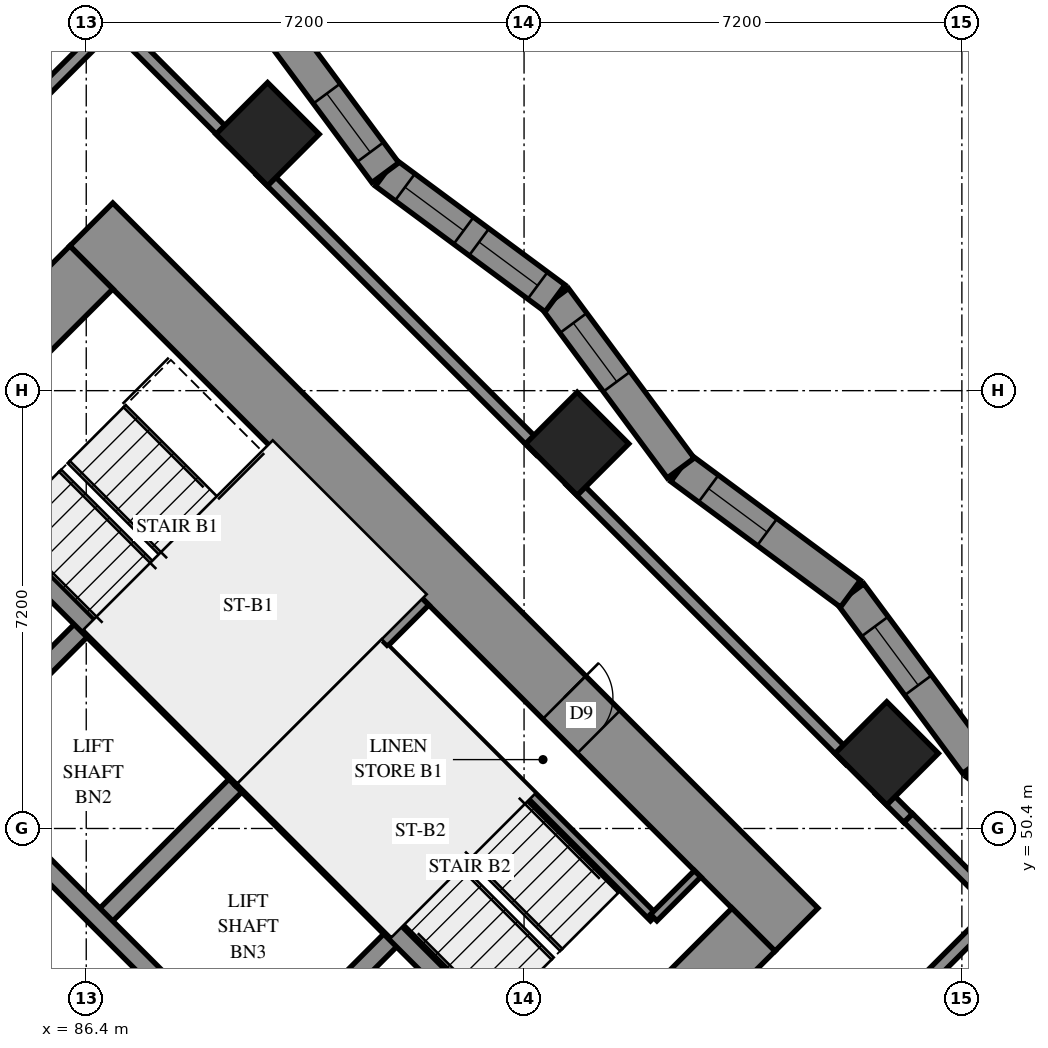
"""IFC4 building model, lengths in metres.
Left out: names, types, materials, properties, quantities, classifications, styles, units other than length and angle.
Written with IfcOpenShell. Run it as: python <this file> out.ifc"""

import sys

from ifc_helpers import new_model, si_unit, direction, frame, frame_2d, origin, origin_2d, place, context, subcontext, project, spatial, polyline, rectangle, outline, extrude, element, fill, save


model = new_model("IFC4")
c1 = context("Model", 3, precision=1e-05, world=origin(), true_north=direction((0.0, 1.0)))
c2 = subcontext(c1, "Body", "Model", "MODEL_VIEW")
j1 = project(units=[si_unit("LENGTHUNIT", "METRE"), si_unit("PLANEANGLEUNIT", "RADIAN")], contexts=[c1])
p1 = place(None, origin())
s1 = spatial("IfcSite", under=j1, at=p1, CompositionType="ELEMENT")
p2 = place(p1, origin())
s2 = spatial("IfcBuilding", under=s1, at=p2, CompositionType="ELEMENT")
p3 = place(p2, frame((0.0, 0.0, 50.8)))
s3 = spatial("IfcBuildingStorey", under=s2, at=p3, CompositionType="ELEMENT", Elevation=50.8)
for number, where, z_axis, x_axis in (
    (1, (89.382, 61.818, 0.0), (0.0, 0.0, 1.0), (0.707, -0.707, 0.0)),
    (2, (94.474, 56.727, 0.0), (0.0, 0.0, 1.0), (0.707, -0.707, 0.0)),
    (3, (99.565, 51.635, 0.0), (0.0, 0.0, 1.0), (0.707, -0.707, 0.0)),
):
    element("IfcColumn", number, at=place(p3, frame(where, z_axis=z_axis, x_axis=x_axis)), inside=s3, PredefinedType="COLUMN", context=c2, shape_type="SweptSolid", body=[
        extrude(rectangle(XDim=1.2, YDim=1.2, at=origin_2d()), origin(), (0.0, 0.0, 1.0), 3.1),
    ])
p4 = place(p3, frame((75.594, 49.443, -0.3), z_axis=(0.0, 0.0, 1.0), x_axis=(0.7071037324, -0.70710983, 0.0)))
e4 = element("IfcWall", 4, at=p4, inside=s3, PredefinedType="SHEAR", context=c2, shape_type="SweptSolid", body=[
    extrude(rectangle(XDim=16.4, YDim=1.0, at=frame_2d((8.2, 0.0))), origin(), (0.0, 0.0, 1.0), 2.7),
])
p5 = place(p3, frame((86.483, 60.333, -0.3), z_axis=(0.0, 0.0, 1.0), x_axis=(0.70710983, -0.7071037324, 0.0)))
e5 = element("IfcWall", 5, at=p5, inside=s3, PredefinedType="SHEAR", context=c2, shape_type="SweptSolid", body=[
    extrude(rectangle(XDim=16.4, YDim=1.0, at=frame_2d((8.2, 0.0))), origin(), (0.0, 0.0, 1.0), 2.7),
])
p6 = place(p5, frame((11.0, 0.0, 0.3)))
e6 = element("IfcOpeningElement", 6, at=p6, cuts=e5, PredefinedType="OPENING", context=c2, shape_type="SweptSolid", body=[
    extrude(rectangle(XDim=0.8, YDim=2.1, at=frame_2d((0.4, 1.05))), frame((0.0, 0.51, 0.0), z_axis=(0.0, -1.0, 0.0), x_axis=(1.0, 0.0, 0.0)), (0.0, 0.0, 1.0), 1.02),
])
p7 = place(p3, frame((76.301, 49.443, -0.3), z_axis=(0.0, 0.0, 1.0), x_axis=(0.7071067812, 0.7071067812, 0.0)))
e7 = element("IfcWall", 7, at=p7, inside=s3, PredefinedType="SHEAR", context=c2, shape_type="SweptSolid", body=[
    extrude(rectangle(XDim=14.4, YDim=1.0, at=frame_2d((7.2, 0.0))), origin(), (0.0, 0.0, 1.0), 2.7),
])
p8 = place(p7, frame((4.55, 0.0, 0.3)))
e8 = element("IfcOpeningElement", 8, at=p8, cuts=e7, PredefinedType="OPENING", context=c2, shape_type="SweptSolid", body=[
    extrude(rectangle(XDim=1.1, YDim=2.1, at=frame_2d((0.55, 1.05))), frame((0.0, 0.51, 0.0), z_axis=(0.0, -1.0, 0.0), x_axis=(1.0, 0.0, 0.0)), (0.0, 0.0, 1.0), 1.02),
])
p9 = place(p7, frame((11.35, 0.0, 0.3)))
e9 = element("IfcOpeningElement", 9, at=p9, cuts=e7, PredefinedType="OPENING", context=c2, shape_type="SweptSolid", body=[
    extrude(rectangle(XDim=1.1, YDim=2.1, at=frame_2d((0.55, 1.05))), frame((0.0, 0.51, 0.0), z_axis=(0.0, -1.0, 0.0), x_axis=(1.0, 0.0, 0.0)), (0.0, 0.0, 1.0), 1.02),
])
p10 = place(p3, frame((87.19, 38.554, -0.3), z_axis=(0.0, 0.0, 1.0), x_axis=(0.707103309, 0.7071102534, 0.0)))
e10 = element("IfcWall", 10, at=p10, inside=s3, PredefinedType="SHEAR", context=c2, shape_type="SweptSolid", body=[
    extrude(rectangle(XDim=14.4, YDim=1.0, at=frame_2d((7.2, 0.0))), origin(), (0.0, 0.0, 1.0), 2.7),
])
p11 = place(p10, frame((4.55, 0.0, 0.3)))
e11 = element("IfcOpeningElement", 11, at=p11, cuts=e10, PredefinedType="OPENING", context=c2, shape_type="SweptSolid", body=[
    extrude(rectangle(XDim=1.1, YDim=2.1, at=frame_2d((0.55, 1.05))), frame((0.0, 0.51, 0.0), z_axis=(0.0, -1.0, 0.0), x_axis=(1.0, 0.0, 0.0)), (0.0, 0.0, 1.0), 1.02),
])
p12 = place(p10, frame((11.35, 0.0, 0.3)))
e12 = element("IfcOpeningElement", 12, at=p12, cuts=e10, PredefinedType="OPENING", context=c2, shape_type="SweptSolid", body=[
    extrude(rectangle(XDim=1.1, YDim=2.1, at=frame_2d((0.55, 1.05))), frame((0.0, 0.51, 0.0), z_axis=(0.0, -1.0, 0.0), x_axis=(1.0, 0.0, 0.0)), (0.0, 0.0, 1.0), 1.02),
])
p13 = place(p3, frame((84.079, 51.423, 0.0), z_axis=(0.0, 0.0, 1.0), x_axis=(0.7071219326, 0.7070916295, 0.0)))
e13 = element("IfcWall", 13, at=p13, inside=s3, PredefinedType="SOLIDWALL", context=c2, shape_type="SweptSolid", body=[
    extrude(rectangle(XDim=3.3, YDim=0.3, at=frame_2d((1.65, 0.0))), origin(), (0.0, 0.0, 1.0), 3.1),
])
for number, where, z_axis, x_axis in (
    (14, (86.625, 48.878, 0.0), (0.0, 0.0, 1.0), (0.707, 0.707, 0.0)),
    (15, (89.17, 46.332, 0.0), (0.0, 0.0, 1.0), (0.707, 0.707, 0.0)),
):
    element("IfcWall", number, at=place(p3, frame(where, z_axis=z_axis, x_axis=x_axis)), inside=s3, PredefinedType="SOLIDWALL", context=c2, shape_type="SweptSolid", body=[
        extrude(rectangle(XDim=3.3, YDim=0.3, at=frame_2d((1.65, 0.0))), origin(), (0.0, 0.0, 1.0), 3.1),
    ])
p14 = place(p3, frame((78.988, 51.423, 0.0), z_axis=(0.0, 0.0, 1.0), x_axis=(0.7071067812, -0.7071067812, 0.0)))
e16 = element("IfcWall", 16, at=p14, inside=s3, PredefinedType="SOLIDWALL", context=c2, shape_type="SweptSolid", body=[
    extrude(rectangle(XDim=14.4, YDim=0.3, at=frame_2d((7.2, 0.0))), origin(), (0.0, 0.0, 1.0), 3.1),
])
p15 = place(p14, frame((1.25, 0.0, 0.0)))
e17 = element("IfcOpeningElement", 17, at=p15, cuts=e16, PredefinedType="OPENING", context=c2, shape_type="SweptSolid", body=[
    extrude(rectangle(XDim=1.1, YDim=2.1, at=frame_2d((0.55, 1.05))), frame((0.0, 0.16, 0.0), z_axis=(0.0, -1.0, 0.0), x_axis=(1.0, 0.0, 0.0)), (0.0, 0.0, 1.0), 0.32),
])
p16 = place(p14, frame((4.85, 0.0, 0.0)))
e18 = element("IfcOpeningElement", 18, at=p16, cuts=e16, PredefinedType="OPENING", context=c2, shape_type="SweptSolid", body=[
    extrude(rectangle(XDim=1.1, YDim=2.1, at=frame_2d((0.55, 1.05))), frame((0.0, 0.16, 0.0), z_axis=(0.0, -1.0, 0.0), x_axis=(1.0, 0.0, 0.0)), (0.0, 0.0, 1.0), 0.32),
])
p17 = place(p14, frame((8.45, 0.0, 0.0)))
e19 = element("IfcOpeningElement", 19, at=p17, cuts=e16, PredefinedType="OPENING", context=c2, shape_type="SweptSolid", body=[
    extrude(rectangle(XDim=1.1, YDim=2.1, at=frame_2d((0.55, 1.05))), frame((0.0, 0.16, 0.0), z_axis=(0.0, -1.0, 0.0), x_axis=(1.0, 0.0, 0.0)), (0.0, 0.0, 1.0), 0.32),
])
p18 = place(p14, frame((12.05, 0.0, 0.0)))
e20 = element("IfcOpeningElement", 20, at=p18, cuts=e16, PredefinedType="OPENING", context=c2, shape_type="SweptSolid", body=[
    extrude(rectangle(XDim=1.1, YDim=2.1, at=frame_2d((0.55, 1.05))), frame((0.0, 0.16, 0.0), z_axis=(0.0, -1.0, 0.0), x_axis=(1.0, 0.0, 0.0)), (0.0, 0.0, 1.0), 0.32),
])
p19 = place(p3, frame((81.534, 53.969, 0.0), z_axis=(0.0, 0.0, 1.0), x_axis=(0.707103309, -0.7071102534, 0.0)))
e21 = element("IfcWall", 21, at=p19, inside=s3, PredefinedType="SOLIDWALL", context=c2, shape_type="SweptSolid", body=[
    extrude(rectangle(XDim=14.4, YDim=0.3, at=frame_2d((7.2, 0.0))), origin(), (0.0, 0.0, 1.0), 3.1),
])
p20 = place(p19, frame((12.05, 0.0, 0.0)))
e22 = element("IfcOpeningElement", 22, at=p20, cuts=e21, PredefinedType="OPENING", context=c2, shape_type="SweptSolid", body=[
    extrude(rectangle(XDim=1.1, YDim=2.1, at=frame_2d((0.55, 1.05))), frame((0.0, 0.16, 0.0), z_axis=(0.0, -1.0, 0.0), x_axis=(1.0, 0.0, 0.0)), (0.0, 0.0, 1.0), 0.32),
])
for number, where, z_axis, x_axis in (
    (23, (83.867, 56.302, 0.0), (0.0, 0.0, 1.0), (0.707, -0.707, 0.0)),
    (24, (88.958, 51.211, 0.0), (0.0, 0.0, 1.0), (0.707, -0.707, 0.0)),
):
    element("IfcWall", number, at=place(p3, frame(where, z_axis=z_axis, x_axis=x_axis)), inside=s3, PredefinedType="SOLIDWALL", context=c2, shape_type="SweptSolid", body=[
        extrude(rectangle(XDim=7.2, YDim=0.3, at=frame_2d((3.6, 0.0))), origin(), (0.0, 0.0, 1.0), 3.1),
    ])
p21 = place(p3, frame((88.958, 51.211, 0.0), z_axis=(0.0, 0.0, 1.0), x_axis=(0.7071067812, 0.7071067812, 0.0)))
e25 = element("IfcWall", 25, at=p21, inside=s3, PredefinedType="SOLIDWALL", context=c2, shape_type="SweptSolid", body=[
    extrude(rectangle(XDim=4.2, YDim=0.3, at=frame_2d((2.1, 0.0))), origin(), (0.0, 0.0, 1.0), 3.1),
])
p22 = place(p3, frame((103.825, 49.403, 0.0), z_axis=(0.0, 0.0, 1.0), x_axis=(-0.8036444119, 0.5951097875, 0.0)))
e26 = element("IfcWall", 26, at=p22, inside=s3, PredefinedType="SOLIDWALL", context=c2, shape_type="SweptSolid", body=[
    extrude(outline(polyline([(-0.041, -0.275), (3.432, -0.275), (3.514, 0.275), (0.041, 0.275), (-0.041, -0.275)])), origin(), (0.0, 0.0, 1.0), 3.1),
])
p23 = place(p22, frame((1.537, 0.0, 0.5)))
e27 = element("IfcOpeningElement", 27, at=p23, cuts=e26, PredefinedType="OPENING", context=c2, shape_type="SweptSolid", body=[
    extrude(rectangle(XDim=1.2, YDim=2.45, at=frame_2d((0.6, 1.225))), frame((0.0, 0.285, 0.0), z_axis=(0.0, -1.0, 0.0), x_axis=(1.0, 0.0, 0.0)), (0.0, 0.0, 1.0), 0.57),
])
p24 = place(p3, frame((101.034, 51.47, 0.0), z_axis=(0.0, 0.0, 1.0), x_axis=(-0.5951097875, 0.8036444119, 0.0)))
e28 = element("IfcWall", 28, at=p24, inside=s3, PredefinedType="SOLIDWALL", context=c2, shape_type="SweptSolid", body=[
    extrude(outline(polyline([(0.041, -0.275), (3.514, -0.275), (3.432, 0.275), (-0.041, 0.275), (0.041, -0.275)])), origin(), (0.0, 0.0, 1.0), 3.1),
])
p25 = place(p24, frame((1.6, 0.0, 0.5)))
e29 = element("IfcOpeningElement", 29, at=p25, cuts=e28, PredefinedType="OPENING", context=c2, shape_type="SweptSolid", body=[
    extrude(rectangle(XDim=1.2, YDim=2.45, at=frame_2d((0.6, 1.225))), frame((0.0, 0.285, 0.0), z_axis=(0.0, -1.0, 0.0), x_axis=(1.0, 0.0, 0.0)), (0.0, 0.0, 1.0), 0.57),
])
p26 = place(p3, frame((98.967, 54.261, 0.0), z_axis=(0.0, 0.0, 1.0), x_axis=(-0.8036306404, 0.5951283843, 0.0)))
e30 = element("IfcWall", 30, at=p26, inside=s3, PredefinedType="SOLIDWALL", context=c2, shape_type="SweptSolid", body=[
    extrude(outline(polyline([(-0.041, -0.275), (3.432, -0.275), (3.514, 0.275), (0.041, 0.275), (-0.041, -0.275)])), origin(), (0.0, 0.0, 1.0), 3.1),
])
p27 = place(p26, frame((1.704, 0.0, 0.5)))
e31 = element("IfcOpeningElement", 31, at=p27, cuts=e30, PredefinedType="OPENING", context=c2, shape_type="SweptSolid", body=[
    extrude(rectangle(XDim=1.2, YDim=2.45, at=frame_2d((0.6, 1.225))), frame((0.0, 0.285, 0.0), z_axis=(0.0, -1.0, 0.0), x_axis=(1.0, 0.0, 0.0)), (0.0, 0.0, 1.0), 0.57),
])
p28 = place(p3, frame((96.176, 56.328, 0.0), z_axis=(0.0, 0.0, 1.0), x_axis=(-0.5951235593, 0.8036342136, 0.0)))
e32 = element("IfcWall", 32, at=p28, inside=s3, PredefinedType="SOLIDWALL", context=c2, shape_type="SweptSolid", body=[
    extrude(outline(polyline([(0.041, -0.275), (3.514, -0.275), (3.432, 0.275), (-0.041, 0.275), (0.041, -0.275)])), origin(), (0.0, 0.0, 1.0), 3.1),
])
p29 = place(p28, frame((1.767, 0.0, 0.5)))
e33 = element("IfcOpeningElement", 33, at=p29, cuts=e32, PredefinedType="OPENING", context=c2, shape_type="SweptSolid", body=[
    extrude(rectangle(XDim=1.2, YDim=2.45, at=frame_2d((0.6, 1.225))), frame((0.0, 0.285, 0.0), z_axis=(0.0, -1.0, 0.0), x_axis=(1.0, 0.0, 0.0)), (0.0, 0.0, 1.0), 0.57),
])
p30 = place(p3, frame((94.11, 59.118, 0.0), z_axis=(0.0, 0.0, 1.0), x_axis=(-0.8036306404, 0.5951283843, 0.0)))
e34 = element("IfcWall", 34, at=p30, inside=s3, PredefinedType="SOLIDWALL", context=c2, shape_type="SweptSolid", body=[
    extrude(outline(polyline([(-0.041, -0.275), (3.432, -0.275), (3.514, 0.275), (0.041, 0.275), (-0.041, -0.275)])), origin(), (0.0, 0.0, 1.0), 3.1),
])
p31 = place(p30, frame((0.355, 0.0, 0.5)))
e35 = element("IfcOpeningElement", 35, at=p31, cuts=e34, PredefinedType="OPENING", context=c2, shape_type="SweptSolid", body=[
    extrude(rectangle(XDim=1.2, YDim=2.45, at=frame_2d((0.6, 1.225))), frame((0.0, 0.285, 0.0), z_axis=(0.0, -1.0, 0.0), x_axis=(1.0, 0.0, 0.0)), (0.0, 0.0, 1.0), 0.57),
])
p32 = place(p30, frame((1.871, 0.0, 0.5)))
e36 = element("IfcOpeningElement", 36, at=p32, cuts=e34, PredefinedType="OPENING", context=c2, shape_type="SweptSolid", body=[
    extrude(rectangle(XDim=1.2, YDim=2.45, at=frame_2d((0.6, 1.225))), frame((0.0, 0.285, 0.0), z_axis=(0.0, -1.0, 0.0), x_axis=(1.0, 0.0, 0.0)), (0.0, 0.0, 1.0), 0.57),
])
p33 = place(p3, frame((91.319, 61.185, 0.0), z_axis=(0.0, 0.0, 1.0), x_axis=(-0.5951235593, 0.8036342136, 0.0)))
e37 = element("IfcWall", 37, at=p33, inside=s3, PredefinedType="SOLIDWALL", context=c2, shape_type="SweptSolid", body=[
    extrude(outline(polyline([(0.041, -0.275), (3.514, -0.275), (3.432, 0.275), (-0.041, 0.275), (0.041, -0.275)])), origin(), (0.0, 0.0, 1.0), 3.1),
])
p34 = place(p33, frame((0.418, 0.0, 0.5)))
e38 = element("IfcOpeningElement", 38, at=p34, cuts=e37, PredefinedType="OPENING", context=c2, shape_type="SweptSolid", body=[
    extrude(rectangle(XDim=1.2, YDim=2.45, at=frame_2d((0.6, 1.225))), frame((0.0, 0.285, 0.0), z_axis=(0.0, -1.0, 0.0), x_axis=(1.0, 0.0, 0.0)), (0.0, 0.0, 1.0), 0.57),
])
p35 = place(p3, frame((91.313, 53.354, 0.0), z_axis=(0.0, 0.0, 1.0), x_axis=(0.7071147811, -0.7070987812, 0.0)))
e39 = element("IfcWall", 39, at=p35, inside=s3, PredefinedType="PARTITIONING", context=c2, shape_type="SweptSolid", body=[
    extrude(rectangle(XDim=6.25, YDim=0.15, at=frame_2d((3.125, 0.0))), origin(), (0.0, 0.0, 1.0), 3.1),
])
p36 = place(p3, frame((95.732, 48.934, 0.0), z_axis=(0.0, 0.0, 1.0), x_axis=(0.7071067812, 0.7071067812, 0.0)))
e40 = element("IfcWall", 40, at=p36, inside=s3, PredefinedType="PARTITIONING", context=c2, shape_type="SweptSolid", body=[
    extrude(rectangle(XDim=1.02, YDim=0.15, at=frame_2d((0.51, 0.0))), origin(), (0.0, 0.0, 1.0), 3.1),
])
p37 = place(p3, frame((95.109, 42.091, 0.0), z_axis=(0.0, 0.0, 1.0), x_axis=(0.7071113651, 0.7071021972, 0.0)))
e41 = element("IfcWall", 41, at=p37, inside=s3, PredefinedType="PARTITIONING", context=c2, shape_type="SweptSolid", body=[
    extrude(rectangle(XDim=10.908, YDim=0.2, at=frame_2d((5.454, 0.0))), origin(), (0.0, 0.0, 1.0), 3.1),
])
p38 = place(p3, frame((94.757, 42.445, 0.0), z_axis=(0.0, 0.0, 1.0), x_axis=(0.7071067812, 0.7071067812, 0.0)))
e42 = element("IfcWall", 42, at=p38, inside=s3, PredefinedType="PARTITIONING", context=c2, shape_type="SweptSolid", body=[
    extrude(rectangle(XDim=9.399, YDim=0.2, at=frame_2d((4.699, 0.0))), origin(), (0.0, 0.0, 1.0), 3.1),
])
p39 = place(p3, frame((81.052, 57.873, 0.0), z_axis=(0.0, 0.0, 1.0), x_axis=(0.7071067812, 0.7071067812, 0.0)))
e43 = element("IfcWall", 43, at=p39, inside=s3, PredefinedType="PARTITIONING", context=c2, shape_type="SweptSolid", body=[
    extrude(rectangle(XDim=8.18, YDim=0.2, at=frame_2d((4.09, 0.0))), origin(), (0.0, 0.0, 1.0), 3.1),
])
p40 = place(p39, frame((0.823, 0.0, 0.0)))
e44 = element("IfcOpeningElement", 44, at=p40, cuts=e43, PredefinedType="OPENING", context=c2, shape_type="SweptSolid", body=[
    extrude(rectangle(XDim=1.0, YDim=2.1, at=frame_2d((0.5, 1.05))), frame((0.0, 0.11, 0.0), z_axis=(0.0, -1.0, 0.0), x_axis=(1.0, 0.0, 0.0)), (0.0, 0.0, 1.0), 0.22),
])
p41 = place(p3, frame((89.271, 61.215, 0.0), z_axis=(0.0, 0.0, 1.0), x_axis=(0.7071067812, -0.7071067812, 0.0)))
e45 = element("IfcWall", 45, at=p41, inside=s3, PredefinedType="PARTITIONING", context=c2, shape_type="SweptSolid", body=[
    extrude(rectangle(XDim=6.505, YDim=0.2, at=frame_2d((3.253, 0.0))), origin(), (0.0, 0.0, 1.0), 3.1),
])
p42 = place(p3, frame((94.363, 56.123, 0.0), z_axis=(0.0, 0.0, 1.0), x_axis=(0.7071067812, -0.7071067812, 0.0)))
e46 = element("IfcWall", 46, at=p42, inside=s3, PredefinedType="PARTITIONING", context=c2, shape_type="SweptSolid", body=[
    extrude(rectangle(XDim=6.503, YDim=0.2, at=frame_2d((3.251, 0.0))), origin(), (0.0, 0.0, 1.0), 3.1),
])
p43 = place(p3, frame((86.841, 63.659, 0.0), z_axis=(0.0, 0.0, 1.0), x_axis=(0.7067795096, -0.7074339014, 0.0)))
e47 = element("IfcWall", 47, at=p43, inside=s3, PredefinedType="PARTITIONING", context=c2, shape_type="SweptSolid", body=[
    extrude(rectangle(XDim=2.751, YDim=0.2, at=frame_2d((1.375, 0.0))), origin(), (0.0, 0.0, 1.0), 3.1),
])
p44 = place(p3, frame((99.918, 50.574, 0.0), z_axis=(0.0, 0.0, 1.0), x_axis=(0.7075827869, -0.7066304548, 0.0)))
e48 = element("IfcWall", 48, at=p44, inside=s3, PredefinedType="PARTITIONING", context=c2, shape_type="SweptSolid", body=[
    extrude(rectangle(XDim=2.1, YDim=0.2, at=frame_2d((1.05, 0.0))), origin(), (0.0, 0.0, 1.0), 3.1),
])
p45 = place(p3, frame((99.453, 51.033, 0.0), z_axis=(0.0, 0.0, 1.0), x_axis=(0.7071067812, -0.7071067812, 0.0)))
e49 = element("IfcWall", 49, at=p45, inside=s3, PredefinedType="PARTITIONING", context=c2, shape_type="SweptSolid", body=[
    extrude(rectangle(XDim=0.653, YDim=0.2, at=frame_2d((0.327, 0.0))), origin(), (0.0, 0.0, 1.0), 3.1),
])
p46 = place(p25, origin())
e50 = element("IfcWindow", 50, at=p46, inside=s3, PartitioningType="SINGLE_PANEL", PredefinedType="WINDOW", context=c2, shape_type="SweptSolid", body=[
    extrude(rectangle(XDim=1.2, YDim=2.45, at=frame_2d((0.6, 1.225))), frame((0.0, 0.155, 0.0), z_axis=(0.0, -1.0, 0.0), x_axis=(1.0, 0.0, 0.0)), (0.0, 0.0, 1.0), 0.06),
])
fill(e29, e50)
p47 = place(p27, origin())
e51 = element("IfcWindow", 51, at=p47, inside=s3, PartitioningType="SINGLE_PANEL", PredefinedType="WINDOW", context=c2, shape_type="SweptSolid", body=[
    extrude(rectangle(XDim=1.2, YDim=2.45, at=frame_2d((0.6, 1.225))), frame((0.0, 0.155, 0.0), z_axis=(0.0, -1.0, 0.0), x_axis=(1.0, 0.0, 0.0)), (0.0, 0.0, 1.0), 0.06),
])
fill(e31, e51)
p48 = place(p29, origin())
e52 = element("IfcWindow", 52, at=p48, inside=s3, PartitioningType="SINGLE_PANEL", PredefinedType="WINDOW", context=c2, shape_type="SweptSolid", body=[
    extrude(rectangle(XDim=1.2, YDim=2.45, at=frame_2d((0.6, 1.225))), frame((0.0, 0.155, 0.0), z_axis=(0.0, -1.0, 0.0), x_axis=(1.0, 0.0, 0.0)), (0.0, 0.0, 1.0), 0.06),
])
fill(e33, e52)
p49 = place(p31, origin())
e53 = element("IfcWindow", 53, at=p49, inside=s3, PartitioningType="SINGLE_PANEL", PredefinedType="WINDOW", context=c2, shape_type="SweptSolid", body=[
    extrude(rectangle(XDim=1.2, YDim=2.45, at=frame_2d((0.6, 1.225))), frame((0.0, 0.155, 0.0), z_axis=(0.0, -1.0, 0.0), x_axis=(1.0, 0.0, 0.0)), (0.0, 0.0, 1.0), 0.06),
])
fill(e35, e53)
p50 = place(p32, origin())
e54 = element("IfcWindow", 54, at=p50, inside=s3, PartitioningType="SINGLE_PANEL", PredefinedType="WINDOW", context=c2, shape_type="SweptSolid", body=[
    extrude(rectangle(XDim=1.2, YDim=2.45, at=frame_2d((0.6, 1.225))), frame((0.0, 0.155, 0.0), z_axis=(0.0, -1.0, 0.0), x_axis=(1.0, 0.0, 0.0)), (0.0, 0.0, 1.0), 0.06),
])
fill(e36, e54)
p51 = place(p34, origin())
e55 = element("IfcWindow", 55, at=p51, inside=s3, PartitioningType="SINGLE_PANEL", PredefinedType="WINDOW", context=c2, shape_type="SweptSolid", body=[
    extrude(rectangle(XDim=1.2, YDim=2.45, at=frame_2d((0.6, 1.225))), frame((0.0, 0.155, 0.0), z_axis=(0.0, -1.0, 0.0), x_axis=(1.0, 0.0, 0.0)), (0.0, 0.0, 1.0), 0.06),
])
fill(e38, e55)
p52 = place(p6, origin())
e56 = element("IfcDoor", 56, at=p52, inside=s3, OperationType="SINGLE_SWING_RIGHT", PredefinedType="DOOR", context=c2, shape_type="SweptSolid", body=[
    extrude(rectangle(XDim=0.8, YDim=2.1, at=frame_2d((0.4, 1.05))), frame((0.0, -0.44, 0.0), z_axis=(0.0, -1.0, 0.0), x_axis=(1.0, 0.0, 0.0)), (0.0, 0.0, 1.0), 0.05),
])
fill(e6, e56)
save(model, sys.argv[1])
